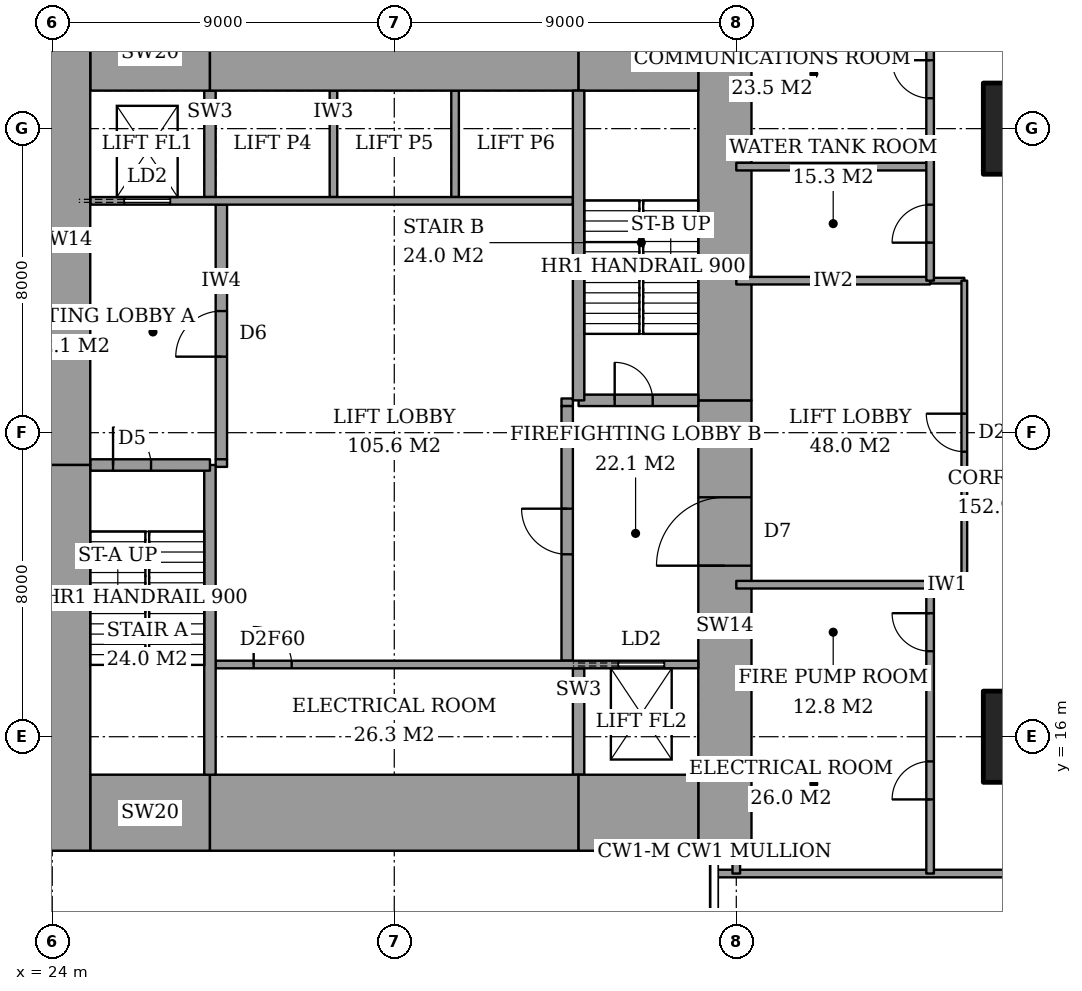
"""IFC4 building model, lengths in metres.
Left out: names, types, materials, properties, quantities, classifications, styles, units other than length and angle.
Written with IfcOpenShell. Run it as: python <this file> out.ifc"""

import sys

from ifc_helpers import new_model, si_unit, direction, frame, frame_2d, origin, origin_2d, place, context, subcontext, project, spatial, rectangle, extrude, element, fill, save


model = new_model("IFC4")
c1 = context("Model", 3, precision=1e-05, world=origin(), true_north=direction((0.0, 1.0)))
c2 = subcontext(c1, "Body", "Model", "MODEL_VIEW")
j1 = project(units=[si_unit("LENGTHUNIT", "METRE"), si_unit("PLANEANGLEUNIT", "RADIAN")], contexts=[c1])
p1 = place(None, origin())
s1 = spatial("IfcSite", under=j1, at=p1, CompositionType="ELEMENT")
p2 = place(p1, origin())
s2 = spatial("IfcBuilding", under=s1, at=p2, CompositionType="ELEMENT")
p3 = place(p2, frame((0.0, 0.0, 291.6)))
s3 = spatial("IfcBuildingStorey", under=s2, at=p3, CompositionType="ELEMENT", Elevation=291.6)
for number, where, z_axis, x_axis in (
    (1, (50.0, 16.0, 0.0), (0.0, 0.0, 1.0), (1.0, 0.0, 0.0)),
    (2, (50.0, 32.0, 0.0), (0.0, 0.0, 1.0), (1.0, 0.0, 0.0)),
):
    element("IfcColumn", number, at=place(p3, frame(where, z_axis=z_axis, x_axis=x_axis)), inside=s3, PredefinedType="COLUMN", context=c2, shape_type="SweptSolid", body=[
        extrude(rectangle(XDim=3.0, YDim=2.4, at=origin_2d()), origin(), (0.0, 0.0, 1.0), 5.0),
    ])
p4 = place(p3, frame((25.0, 14.0, 0.0), z_axis=(0.0, 0.0, 1.0), x_axis=(1.0, 0.0, 0.0)))
e3 = element("IfcWall", 3, at=p4, inside=s3, PredefinedType="SHEAR", context=c2, shape_type="SweptSolid", body=[
    extrude(rectangle(XDim=3.15, YDim=2.0, at=frame_2d((1.575, 0.0))), origin(), (0.0, 0.0, 1.0), 5.0),
])
p5 = place(p3, frame((28.15, 14.0, 0.0), z_axis=(0.0, 0.0, 1.0), x_axis=(1.0, 0.0, 0.0)))
e4 = element("IfcWall", 4, at=p5, inside=s3, PredefinedType="SHEAR", context=c2, shape_type="SweptSolid", body=[
    extrude(rectangle(XDim=9.7, YDim=2.0, at=frame_2d((4.85, 0.0))), origin(), (0.0, 0.0, 1.0), 5.0),
])
for number, where, z_axis, x_axis in (
    (5, (37.85, 14.0, 0.0), (0.0, 0.0, 1.0), (1.0, 0.0, 0.0)),
    (6, (25.0, 34.0, 0.0), (0.0, 0.0, 1.0), (1.0, 0.0, 0.0)),
):
    element("IfcWall", number, at=place(p3, frame(where, z_axis=z_axis, x_axis=x_axis)), inside=s3, PredefinedType="SHEAR", context=c2, shape_type="SweptSolid", body=[
        extrude(rectangle(XDim=3.15, YDim=2.0, at=frame_2d((1.575, 0.0))), origin(), (0.0, 0.0, 1.0), 5.0),
    ])
p6 = place(p3, frame((28.15, 34.0, 0.0), z_axis=(0.0, 0.0, 1.0), x_axis=(1.0, 0.0, 0.0)))
e7 = element("IfcWall", 7, at=p6, inside=s3, PredefinedType="SHEAR", context=c2, shape_type="SweptSolid", body=[
    extrude(rectangle(XDim=9.7, YDim=2.0, at=frame_2d((4.85, 0.0))), origin(), (0.0, 0.0, 1.0), 5.0),
])
p7 = place(p3, frame((37.85, 34.0, 0.0), z_axis=(0.0, 0.0, 1.0), x_axis=(1.0, 0.0, 0.0)))
e8 = element("IfcWall", 8, at=p7, inside=s3, PredefinedType="SHEAR", context=c2, shape_type="SweptSolid", body=[
    extrude(rectangle(XDim=3.15, YDim=2.0, at=frame_2d((1.575, 0.0))), origin(), (0.0, 0.0, 1.0), 5.0),
])
p8 = place(p3, frame((24.3, 13.0, 0.0), z_axis=(0.0, 0.0, 1.0), x_axis=(0.0, 1.0, 0.0)))
e9 = element("IfcWall", 9, at=p8, inside=s3, PredefinedType="SHEAR", context=c2, shape_type="SweptSolid", body=[
    extrude(rectangle(XDim=10.15, YDim=1.4, at=frame_2d((5.075, 0.0))), origin(), (0.0, 0.0, 1.0), 5.0),
])
p9 = place(p3, frame((24.3, 23.15, 0.0), z_axis=(0.0, 0.0, 1.0), x_axis=(0.0, 1.0, 0.0)))
e10 = element("IfcWall", 10, at=p9, inside=s3, PredefinedType="SHEAR", context=c2, shape_type="SweptSolid", body=[
    extrude(rectangle(XDim=11.85, YDim=1.4, at=frame_2d((5.925, 0.0))), origin(), (0.0, 0.0, 1.0), 5.0),
])
p10 = place(p3, frame((41.7, 13.0, 0.0), z_axis=(0.0, 0.0, 1.0), x_axis=(0.0, 1.0, 0.0)))
e11 = element("IfcWall", 11, at=p10, inside=s3, PredefinedType="SHEAR", context=c2, shape_type="SweptSolid", body=[
    extrude(rectangle(XDim=11.85, YDim=1.4, at=frame_2d((5.925, 0.0))), origin(), (0.0, 0.0, 1.0), 5.0),
])
p11 = place(p10, frame((7.5, 0.0, 0.0)))
e12 = element("IfcOpeningElement", 12, at=p11, cuts=e11, PredefinedType="OPENING", context=c2, shape_type="SweptSolid", body=[
    extrude(rectangle(XDim=1.8, YDim=2.4, at=frame_2d((0.9, 1.2))), frame((0.0, 0.71, 0.0), z_axis=(0.0, -1.0, 0.0), x_axis=(1.0, 0.0, 0.0)), (0.0, 0.0, 1.0), 1.42),
])
p12 = place(p3, frame((41.7, 24.85, 0.0), z_axis=(0.0, 0.0, 1.0), x_axis=(0.0, 1.0, 0.0)))
e13 = element("IfcWall", 13, at=p12, inside=s3, PredefinedType="SHEAR", context=c2, shape_type="SweptSolid", body=[
    extrude(rectangle(XDim=10.15, YDim=1.4, at=frame_2d((5.075, 0.0))), origin(), (0.0, 0.0, 1.0), 5.0),
])
p13 = place(p3, frame((28.15, 15.0, 0.0), z_axis=(0.0, 0.0, 1.0), x_axis=(0.0, 1.0, 0.0)))
e14 = element("IfcWall", 14, at=p13, inside=s3, PredefinedType="SHEAR", context=c2, shape_type="SweptSolid", body=[
    extrude(rectangle(XDim=8.15, YDim=0.3, at=frame_2d((4.075, 0.0))), origin(), (0.0, 0.0, 1.0), 5.0),
])
p14 = place(p3, frame((25.0, 23.15, 0.0), z_axis=(0.0, 0.0, 1.0), x_axis=(1.0, 0.0, 0.0)))
e15 = element("IfcWall", 15, at=p14, inside=s3, PredefinedType="SHEAR", context=c2, shape_type="SweptSolid", body=[
    extrude(rectangle(XDim=3.15, YDim=0.3, at=frame_2d((1.575, 0.0))), origin(), (0.0, 0.0, 1.0), 5.0),
])
p15 = place(p14, frame((0.6, 0.0, 0.0)))
e16 = element("IfcOpeningElement", 16, at=p15, cuts=e15, PredefinedType="OPENING", context=c2, shape_type="SweptSolid", body=[
    extrude(rectangle(XDim=1.0, YDim=2.1, at=frame_2d((0.5, 1.05))), frame((0.0, 0.16, 0.0), z_axis=(0.0, -1.0, 0.0), x_axis=(1.0, 0.0, 0.0)), (0.0, 0.0, 1.0), 0.32),
])
p16 = place(p3, frame((37.85, 24.85, 0.0), z_axis=(0.0, 0.0, 1.0), x_axis=(0.0, 1.0, 0.0)))
e17 = element("IfcWall", 17, at=p16, inside=s3, PredefinedType="SHEAR", context=c2, shape_type="SweptSolid", body=[
    extrude(rectangle(XDim=8.15, YDim=0.3, at=frame_2d((4.075, 0.0))), origin(), (0.0, 0.0, 1.0), 5.0),
])
p17 = place(p3, frame((37.85, 24.85, 0.0), z_axis=(0.0, 0.0, 1.0), x_axis=(1.0, 0.0, 0.0)))
e18 = element("IfcWall", 18, at=p17, inside=s3, PredefinedType="SHEAR", context=c2, shape_type="SweptSolid", body=[
    extrude(rectangle(XDim=3.15, YDim=0.3, at=frame_2d((1.575, 0.0))), origin(), (0.0, 0.0, 1.0), 5.0),
])
p18 = place(p17, frame((0.95, 0.0, 0.0)))
e19 = element("IfcOpeningElement", 19, at=p18, cuts=e18, PredefinedType="OPENING", context=c2, shape_type="SweptSolid", body=[
    extrude(rectangle(XDim=1.0, YDim=2.1, at=frame_2d((0.5, 1.05))), frame((0.0, 0.16, 0.0), z_axis=(0.0, -1.0, 0.0), x_axis=(1.0, 0.0, 0.0)), (0.0, 0.0, 1.0), 0.32),
])
p19 = place(p3, frame((28.45, 23.3, 0.0), z_axis=(0.0, 0.0, 1.0), x_axis=(0.0, 1.0, 0.0)))
e20 = element("IfcWall", 20, at=p19, inside=s3, PredefinedType="PARTITIONING", context=c2, shape_type="SweptSolid", body=[
    extrude(rectangle(XDim=6.7, YDim=0.3, at=frame_2d((3.35, 0.0))), origin(), (0.0, 0.0, 1.0), 5.0),
])
p20 = place(p19, frame((2.7, 0.0, 0.0)))
e21 = element("IfcOpeningElement", 21, at=p20, cuts=e20, PredefinedType="OPENING", context=c2, shape_type="SweptSolid", body=[
    extrude(rectangle(XDim=1.2, YDim=2.1, at=frame_2d((0.6, 1.05))), frame((0.0, 0.16, 0.0), z_axis=(0.0, -1.0, 0.0), x_axis=(1.0, 0.0, 0.0)), (0.0, 0.0, 1.0), 0.32),
])
p21 = place(p3, frame((37.55, 18.0, 0.0), z_axis=(0.0, 0.0, 1.0), x_axis=(0.0, 1.0, 0.0)))
e22 = element("IfcWall", 22, at=p21, inside=s3, PredefinedType="PARTITIONING", context=c2, shape_type="SweptSolid", body=[
    extrude(rectangle(XDim=6.7, YDim=0.3, at=frame_2d((3.35, 0.0))), origin(), (0.0, 0.0, 1.0), 5.0),
])
p22 = place(p21, frame((2.8, 0.0, 0.0)))
e23 = element("IfcOpeningElement", 23, at=p22, cuts=e22, PredefinedType="OPENING", context=c2, shape_type="SweptSolid", body=[
    extrude(rectangle(XDim=1.2, YDim=2.1, at=frame_2d((0.6, 1.05))), frame((0.0, 0.16, 0.0), z_axis=(0.0, -1.0, 0.0), x_axis=(1.0, 0.0, 0.0)), (0.0, 0.0, 1.0), 0.32),
])
p23 = place(p3, frame((41.439, 12.4, 0.0), z_axis=(0.0, 0.0, 1.0), x_axis=(1.0, 0.0, 0.0)))
e24 = element("IfcWall", 24, at=p23, inside=s3, PredefinedType="PARTITIONING", context=c2, shape_type="SweptSolid", body=[
    extrude(rectangle(XDim=25.011, YDim=0.2, at=frame_2d((12.505, 0.0))), origin(), (0.0, 0.0, 1.0), 4.7),
])
p24 = place(p23, frame((9.111, 0.0, 0.0)))
e25 = element("IfcOpeningElement", 25, at=p24, cuts=e24, PredefinedType="OPENING", context=c2, shape_type="SweptSolid", body=[
    extrude(rectangle(XDim=1.0, YDim=2.1, at=frame_2d((0.5, 1.05))), frame((0.0, 0.11, 0.0), z_axis=(0.0, -1.0, 0.0), x_axis=(1.0, 0.0, 0.0)), (0.0, 0.0, 1.0), 0.22),
])
for number, where, z_axis, x_axis in (
    (26, (42.0, 17.5, 0.0), (0.0, 0.0, 1.0), (1.0, 0.0, 0.0)),
    (27, (42.0, 20.0, 0.0), (0.0, 0.0, 1.0), (1.0, 0.0, 0.0)),
):
    element("IfcWall", number, at=place(p3, frame(where, z_axis=z_axis, x_axis=x_axis)), inside=s3, PredefinedType="PARTITIONING", context=c2, shape_type="SweptSolid", body=[
        extrude(rectangle(XDim=5.1, YDim=0.2, at=frame_2d((2.55, 0.0))), origin(), (0.0, 0.0, 1.0), 4.7),
    ])
p25 = place(p3, frame((47.1, 20.0, 0.0), z_axis=(0.0, 0.0, 1.0), x_axis=(1.0, 0.0, 0.0)))
e28 = element("IfcWall", 28, at=p25, inside=s3, PredefinedType="PARTITIONING", context=c2, shape_type="SweptSolid", body=[
    extrude(rectangle(XDim=0.9, YDim=0.15, at=frame_2d((0.45, 0.0))), origin(), (0.0, 0.0, 1.0), 4.7),
])
p26 = place(p3, frame((42.0, 28.0, 0.0), z_axis=(0.0, 0.0, 1.0), x_axis=(1.0, 0.0, 0.0)))
e29 = element("IfcWall", 29, at=p26, inside=s3, PredefinedType="PARTITIONING", context=c2, shape_type="SweptSolid", body=[
    extrude(rectangle(XDim=5.1, YDim=0.2, at=frame_2d((2.55, 0.0))), origin(), (0.0, 0.0, 1.0), 4.7),
])
p27 = place(p3, frame((47.1, 28.0, 0.0), z_axis=(0.0, 0.0, 1.0), x_axis=(1.0, 0.0, 0.0)))
e30 = element("IfcWall", 30, at=p27, inside=s3, PredefinedType="PARTITIONING", context=c2, shape_type="SweptSolid", body=[
    extrude(rectangle(XDim=0.9, YDim=0.15, at=frame_2d((0.45, 0.0))), origin(), (0.0, 0.0, 1.0), 4.7),
])
p28 = place(p3, frame((42.0, 31.0, 0.0), z_axis=(0.0, 0.0, 1.0), x_axis=(1.0, 0.0, 0.0)))
e31 = element("IfcWall", 31, at=p28, inside=s3, PredefinedType="PARTITIONING", context=c2, shape_type="SweptSolid", body=[
    extrude(rectangle(XDim=5.1, YDim=0.2, at=frame_2d((2.55, 0.0))), origin(), (0.0, 0.0, 1.0), 4.7),
])
p29 = place(p3, frame((42.0, 12.4, 0.0), z_axis=(0.0, 0.0, 1.0), x_axis=(0.0, 1.0, 0.0)))
e32 = element("IfcWall", 32, at=p29, inside=s3, PredefinedType="PARTITIONING", context=c2, shape_type="SweptSolid", body=[
    extrude(rectangle(XDim=0.6, YDim=0.2, at=frame_2d((0.3, 0.0))), origin(), (0.0, 0.0, 1.0), 4.7),
])
p30 = place(p3, frame((47.1, 12.4, 0.0), z_axis=(0.0, 0.0, 1.0), x_axis=(0.0, 1.0, 0.0)))
e33 = element("IfcWall", 33, at=p30, inside=s3, PredefinedType="PARTITIONING", context=c2, shape_type="SweptSolid", body=[
    extrude(rectangle(XDim=7.6, YDim=0.2, at=frame_2d((3.8, 0.0))), origin(), (0.0, 0.0, 1.0), 4.7),
])
p31 = place(p30, frame((1.95, 0.0, 0.0)))
e34 = element("IfcOpeningElement", 34, at=p31, cuts=e33, PredefinedType="OPENING", context=c2, shape_type="SweptSolid", body=[
    extrude(rectangle(XDim=1.0, YDim=2.1, at=frame_2d((0.5, 1.05))), frame((0.0, 0.11, 0.0), z_axis=(0.0, -1.0, 0.0), x_axis=(1.0, 0.0, 0.0)), (0.0, 0.0, 1.0), 0.22),
])
p32 = place(p30, frame((5.85, 0.0, 0.0)))
e35 = element("IfcOpeningElement", 35, at=p32, cuts=e33, PredefinedType="OPENING", context=c2, shape_type="SweptSolid", body=[
    extrude(rectangle(XDim=1.0, YDim=2.1, at=frame_2d((0.5, 1.05))), frame((0.0, 0.11, 0.0), z_axis=(0.0, -1.0, 0.0), x_axis=(1.0, 0.0, 0.0)), (0.0, 0.0, 1.0), 0.22),
])
p33 = place(p3, frame((47.1, 28.0, 0.0), z_axis=(0.0, 0.0, 1.0), x_axis=(0.0, 1.0, 0.0)))
e36 = element("IfcWall", 36, at=p33, inside=s3, PredefinedType="PARTITIONING", context=c2, shape_type="SweptSolid", body=[
    extrude(rectangle(XDim=7.6, YDim=0.2, at=frame_2d((3.8, 0.0))), origin(), (0.0, 0.0, 1.0), 4.7),
])
p34 = place(p33, frame((1.0, 0.0, 0.0)))
e37 = element("IfcOpeningElement", 37, at=p34, cuts=e36, PredefinedType="OPENING", context=c2, shape_type="SweptSolid", body=[
    extrude(rectangle(XDim=1.0, YDim=2.1, at=frame_2d((0.5, 1.05))), frame((0.0, 0.11, 0.0), z_axis=(0.0, -1.0, 0.0), x_axis=(1.0, 0.0, 0.0)), (0.0, 0.0, 1.0), 0.22),
])
p35 = place(p33, frame((4.8, 0.0, 0.0)))
e38 = element("IfcOpeningElement", 38, at=p35, cuts=e36, PredefinedType="OPENING", context=c2, shape_type="SweptSolid", body=[
    extrude(rectangle(XDim=1.0, YDim=2.1, at=frame_2d((0.5, 1.05))), frame((0.0, 0.11, 0.0), z_axis=(0.0, -1.0, 0.0), x_axis=(1.0, 0.0, 0.0)), (0.0, 0.0, 1.0), 0.22),
])
p36 = place(p3, frame((48.0, 20.0, 0.0), z_axis=(0.0, 0.0, 1.0), x_axis=(0.0, 1.0, 0.0)))
e39 = element("IfcWall", 39, at=p36, inside=s3, PredefinedType="PARTITIONING", context=c2, shape_type="SweptSolid", body=[
    extrude(rectangle(XDim=8.0, YDim=0.15, at=frame_2d((4.0, 0.0))), origin(), (0.0, 0.0, 1.0), 4.7),
])
p37 = place(p36, frame((3.5, 0.0, 0.0)))
e40 = element("IfcOpeningElement", 40, at=p37, cuts=e39, PredefinedType="OPENING", context=c2, shape_type="SweptSolid", body=[
    extrude(rectangle(XDim=1.0, YDim=2.1, at=frame_2d((0.5, 1.05))), frame((0.0, 0.085, 0.0), z_axis=(0.0, -1.0, 0.0), x_axis=(1.0, 0.0, 0.0)), (0.0, 0.0, 1.0), 0.17),
])
p38 = place(p3, frame((28.3, 17.9, 0.0), z_axis=(0.0, 0.0, 1.0), x_axis=(1.0, 0.0, 0.0)))
e41 = element("IfcWall", 41, at=p38, inside=s3, PredefinedType="PARTITIONING", context=c2, shape_type="SweptSolid", body=[
    extrude(rectangle(XDim=12.7, YDim=0.2, at=frame_2d((6.35, 0.0))), origin(), (0.0, 0.0, 1.0), 5.0),
])
p39 = place(p38, frame((1.0, 0.0, 0.0)))
e42 = element("IfcOpeningElement", 42, at=p39, cuts=e41, PredefinedType="OPENING", context=c2, shape_type="SweptSolid", body=[
    extrude(rectangle(XDim=1.0, YDim=2.1, at=frame_2d((0.5, 1.05))), frame((0.0, 0.11, 0.0), z_axis=(0.0, -1.0, 0.0), x_axis=(1.0, 0.0, 0.0)), (0.0, 0.0, 1.0), 0.22),
])
p40 = place(p38, frame((10.6, 0.0, 0.0)))
e43 = element("IfcOpeningElement", 43, at=p40, cuts=e41, PredefinedType="OPENING", context=c2, shape_type="SweptSolid", body=[
    extrude(rectangle(XDim=1.2, YDim=2.1, at=frame_2d((0.6, 1.05))), frame((0.0, 0.11, 0.0), z_axis=(0.0, -1.0, 0.0), x_axis=(1.0, 0.0, 0.0)), (0.0, 0.0, 1.0), 0.22),
])
p41 = place(p3, frame((25.0, 30.1, 0.0), z_axis=(0.0, 0.0, 1.0), x_axis=(1.0, 0.0, 0.0)))
e44 = element("IfcWall", 44, at=p41, inside=s3, PredefinedType="PARTITIONING", context=c2, shape_type="SweptSolid", body=[
    extrude(rectangle(XDim=12.7, YDim=0.2, at=frame_2d((6.35, 0.0))), origin(), (0.0, 0.0, 1.0), 5.0),
])
p42 = place(p41, frame((0.9, 0.0, 0.0)))
e45 = element("IfcOpeningElement", 45, at=p42, cuts=e44, PredefinedType="OPENING", context=c2, shape_type="SweptSolid", body=[
    extrude(rectangle(XDim=1.2, YDim=2.1, at=frame_2d((0.6, 1.05))), frame((0.0, 0.11, 0.0), z_axis=(0.0, -1.0, 0.0), x_axis=(1.0, 0.0, 0.0)), (0.0, 0.0, 1.0), 0.22),
])
p43 = place(p3, frame((37.85, 15.0, 0.0), z_axis=(0.0, 0.0, 1.0), x_axis=(0.0, 1.0, 0.0)))
e46 = element("IfcWall", 46, at=p43, inside=s3, PredefinedType="SHEAR", context=c2, shape_type="SweptSolid", body=[
    extrude(rectangle(XDim=2.8, YDim=0.3, at=frame_2d((1.4, 0.0))), origin(), (0.0, 0.0, 1.0), 5.0),
])
for number, where, z_axis, x_axis in (
    (47, (31.4, 30.2, 0.0), (0.0, 0.0, 1.0), (0.0, 1.0, 0.0)),
    (48, (34.6, 30.2, 0.0), (0.0, 0.0, 1.0), (0.0, 1.0, 0.0)),
):
    element("IfcWall", number, at=place(p3, frame(where, z_axis=z_axis, x_axis=x_axis)), inside=s3, PredefinedType="PARTITIONING", context=c2, shape_type="SweptSolid", body=[
        extrude(rectangle(XDim=2.8, YDim=0.2, at=frame_2d((1.4, 0.0))), origin(), (0.0, 0.0, 1.0), 5.0),
    ])
p44 = place(p3, frame((28.15, 30.2, 0.0), z_axis=(0.0, 0.0, 1.0), x_axis=(0.0, 1.0, 0.0)))
e49 = element("IfcWall", 49, at=p44, inside=s3, PredefinedType="SHEAR", context=c2, shape_type="SweptSolid", body=[
    extrude(rectangle(XDim=2.8, YDim=0.3, at=frame_2d((1.4, 0.0))), origin(), (0.0, 0.0, 1.0), 5.0),
])
for number, where, z_axis, x_axis in (
    (50, (28.3, 23.2, 0.0), (0.0, 0.0, 1.0), (1.0, 0.0, 0.0)),
    (51, (37.4, 24.8, 0.0), (0.0, 0.0, 1.0), (1.0, 0.0, 0.0)),
):
    element("IfcWall", number, at=place(p3, frame(where, z_axis=z_axis, x_axis=x_axis)), inside=s3, PredefinedType="PARTITIONING", context=c2, shape_type="SweptSolid", body=[
        extrude(rectangle(XDim=0.3, YDim=0.2, at=frame_2d((0.15, 0.0))), origin(), (0.0, 0.0, 1.0), 5.0),
    ])
p45 = place(p37, origin())
e52 = element("IfcDoor", 52, at=p45, inside=s3, OperationType="SINGLE_SWING_LEFT", PredefinedType="DOOR", context=c2, shape_type="SweptSolid", body=[
    extrude(rectangle(XDim=1.0, YDim=2.1, at=frame_2d((0.5, 1.05))), frame((0.0, 0.025, 0.0), z_axis=(0.0, -1.0, 0.0), x_axis=(1.0, 0.0, 0.0)), (0.0, 0.0, 1.0), 0.05),
])
fill(e40, e52)
p46 = place(p31, origin())
e53 = element("IfcDoor", 53, at=p46, inside=s3, OperationType="SINGLE_SWING_RIGHT", PredefinedType="DOOR", context=c2, shape_type="SweptSolid", body=[
    extrude(rectangle(XDim=1.0, YDim=2.1, at=frame_2d((0.5, 1.05))), frame((0.0, 0.025, 0.0), z_axis=(0.0, -1.0, 0.0), x_axis=(1.0, 0.0, 0.0)), (0.0, 0.0, 1.0), 0.05),
])
fill(e34, e53)
p47 = place(p32, origin())
e54 = element("IfcDoor", 54, at=p47, inside=s3, OperationType="SINGLE_SWING_LEFT", PredefinedType="DOOR", context=c2, shape_type="SweptSolid", body=[
    extrude(rectangle(XDim=1.0, YDim=2.1, at=frame_2d((0.5, 1.05))), frame((0.0, 0.025, 0.0), z_axis=(0.0, -1.0, 0.0), x_axis=(1.0, 0.0, 0.0)), (0.0, 0.0, 1.0), 0.05),
])
fill(e35, e54)
p48 = place(p34, origin())
e55 = element("IfcDoor", 55, at=p48, inside=s3, OperationType="SINGLE_SWING_RIGHT", PredefinedType="DOOR", context=c2, shape_type="SweptSolid", body=[
    extrude(rectangle(XDim=1.0, YDim=2.1, at=frame_2d((0.5, 1.05))), frame((0.0, 0.025, 0.0), z_axis=(0.0, -1.0, 0.0), x_axis=(1.0, 0.0, 0.0)), (0.0, 0.0, 1.0), 0.05),
])
fill(e37, e55)
p49 = place(p35, origin())
e56 = element("IfcDoor", 56, at=p49, inside=s3, OperationType="SINGLE_SWING_LEFT", PredefinedType="DOOR", context=c2, shape_type="SweptSolid", body=[
    extrude(rectangle(XDim=1.0, YDim=2.1, at=frame_2d((0.5, 1.05))), frame((0.0, 0.025, 0.0), z_axis=(0.0, -1.0, 0.0), x_axis=(1.0, 0.0, 0.0)), (0.0, 0.0, 1.0), 0.05),
])
fill(e38, e56)
p50 = place(p15, origin())
e57 = element("IfcDoor", 57, at=p50, inside=s3, OperationType="SINGLE_SWING_RIGHT", PredefinedType="DOOR", context=c2, shape_type="SweptSolid", body=[
    extrude(rectangle(XDim=1.0, YDim=2.1, at=frame_2d((0.5, 1.05))), frame((0.0, 0.025, 0.0), z_axis=(0.0, -1.0, 0.0), x_axis=(1.0, 0.0, 0.0)), (0.0, 0.0, 1.0), 0.05),
])
fill(e16, e57)
p51 = place(p18, origin())
e58 = element("IfcDoor", 58, at=p51, inside=s3, OperationType="SINGLE_SWING_RIGHT", PredefinedType="DOOR", context=c2, shape_type="SweptSolid", body=[
    extrude(rectangle(XDim=1.0, YDim=2.1, at=frame_2d((0.5, 1.05))), frame((0.0, 0.025, 0.0), z_axis=(0.0, -1.0, 0.0), x_axis=(1.0, 0.0, 0.0)), (0.0, 0.0, 1.0), 0.05),
])
fill(e19, e58)
p52 = place(p20, origin())
e59 = element("IfcDoor", 59, at=p52, inside=s3, OperationType="SINGLE_SWING_RIGHT", PredefinedType="DOOR", context=c2, shape_type="SweptSolid", body=[
    extrude(rectangle(XDim=1.2, YDim=2.1, at=frame_2d((0.6, 1.05))), frame((0.0, 0.025, 0.0), z_axis=(0.0, -1.0, 0.0), x_axis=(1.0, 0.0, 0.0)), (0.0, 0.0, 1.0), 0.05),
])
fill(e21, e59)
p53 = place(p22, origin())
e60 = element("IfcDoor", 60, at=p53, inside=s3, OperationType="SINGLE_SWING_LEFT", PredefinedType="DOOR", context=c2, shape_type="SweptSolid", body=[
    extrude(rectangle(XDim=1.2, YDim=2.1, at=frame_2d((0.6, 1.05))), frame((0.0, 0.025, 0.0), z_axis=(0.0, -1.0, 0.0), x_axis=(1.0, 0.0, 0.0)), (0.0, 0.0, 1.0), 0.05),
])
fill(e23, e60)
p54 = place(p11, origin())
e61 = element("IfcDoor", 61, at=p54, inside=s3, OperationType="DOUBLE_DOOR_DOUBLE_SWING", PredefinedType="DOOR", context=c2, shape_type="SweptSolid", body=[
    extrude(rectangle(XDim=1.8, YDim=2.4, at=frame_2d((0.9, 1.2))), frame((0.0, 0.025, 0.0), z_axis=(0.0, -1.0, 0.0), x_axis=(1.0, 0.0, 0.0)), (0.0, 0.0, 1.0), 0.05),
])
fill(e12, e61)
p55 = place(p39, origin())
e62 = element("IfcDoor", 62, at=p55, inside=s3, OperationType="SINGLE_SWING_RIGHT", PredefinedType="DOOR", context=c2, shape_type="SweptSolid", body=[
    extrude(rectangle(XDim=1.0, YDim=2.1, at=frame_2d((0.5, 1.05))), frame((0.0, 0.025, 0.0), z_axis=(0.0, -1.0, 0.0), x_axis=(1.0, 0.0, 0.0)), (0.0, 0.0, 1.0), 0.05),
])
fill(e42, e62)
p56 = place(p42, origin())
e63 = element("IfcDoor", 63, at=p56, inside=s3, OperationType="SLIDING_TO_LEFT", PredefinedType="DOOR", context=c2, shape_type="SweptSolid", body=[
    extrude(rectangle(XDim=1.2, YDim=2.1, at=frame_2d((0.6, 1.05))), frame((0.0, 0.025, 0.0), z_axis=(0.0, -1.0, 0.0), x_axis=(1.0, 0.0, 0.0)), (0.0, 0.0, 1.0), 0.05),
])
fill(e45, e63)
p57 = place(p40, origin())
e64 = element("IfcDoor", 64, at=p57, inside=s3, OperationType="SLIDING_TO_LEFT", PredefinedType="DOOR", context=c2, shape_type="SweptSolid", body=[
    extrude(rectangle(XDim=1.2, YDim=2.1, at=frame_2d((0.6, 1.05))), frame((0.0, 0.025, 0.0), z_axis=(0.0, -1.0, 0.0), x_axis=(1.0, 0.0, 0.0)), (0.0, 0.0, 1.0), 0.05),
])
fill(e43, e64)
save(model, sys.argv[1])
